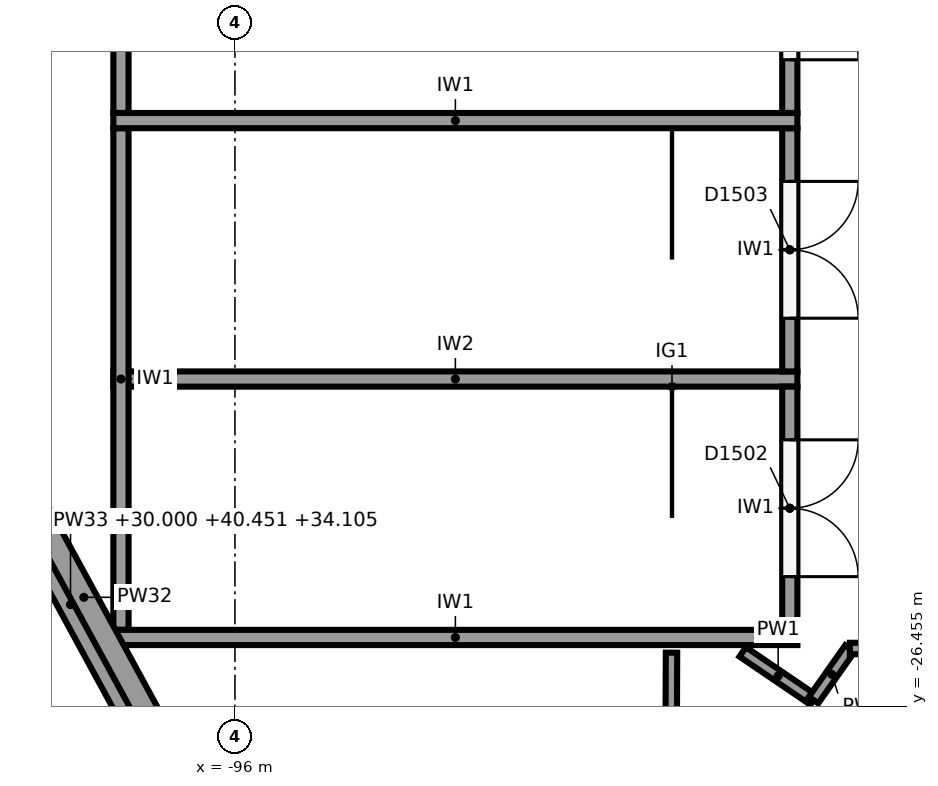
"""IFC4 building model, lengths in metres.
Left out: names, types, materials, properties, quantities, classifications, styles, units other than length and angle.
Written with IfcOpenShell. Run it as: python <this file> out.ifc"""

import sys

from ifc_helpers import new_model, si_unit, direction, frame, frame_2d, origin, place, context, subcontext, project, spatial, polyline, rectangle, outline, extrude, element, fill, save


model = new_model("IFC4")
c1 = context("Model", 3, precision=1e-05, world=origin(), true_north=direction((0.0, 1.0)))
c2 = subcontext(c1, "Body", "Model", "MODEL_VIEW")
j1 = project(units=[si_unit("LENGTHUNIT", "METRE"), si_unit("PLANEANGLEUNIT", "RADIAN")], contexts=[c1])
p1 = place(None, origin())
s1 = spatial("IfcSite", under=j1, at=p1, CompositionType="ELEMENT")
p2 = place(p1, origin())
s2 = spatial("IfcBuilding", under=s1, at=p2, CompositionType="ELEMENT")
p3 = place(p2, frame((0.0, 0.0, 24.0)))
s3 = spatial("IfcBuildingStorey", under=s2, at=p3, CompositionType="ELEMENT", Elevation=24.0)
p4 = place(p3, frame((-101.337, -18.215, 0.0), z_axis=(0.0, 0.0, 1.0), x_axis=(0.477865020076, 0.878433277255, 0.0)))
e1 = element("IfcWall", 1, at=p4, inside=s3, PredefinedType="SOLIDWALL", context=c2, shape_type="SweptSolid", body=[
    extrude(rectangle(XDim=7.28, YDim=0.32, at=frame_2d((3.64, 0.0))), origin(), (0.0, 0.0, 1.0), 6.0),
])
p5 = place(p4, frame((1.13, 0.0, 1.0)))
e2 = element("IfcOpeningElement", 2, at=p5, cuts=e1, PredefinedType="OPENING", context=c2, shape_type="SweptSolid", body=[
    extrude(rectangle(XDim=0.9, YDim=3.25, at=frame_2d((0.45, 1.625))), frame((0.0, 0.17, 0.0), z_axis=(0.0, -1.0, 0.0), x_axis=(1.0, 0.0, 0.0)), (0.0, 0.0, 1.0), 0.34),
])
p6 = place(p3, frame((-101.337, -18.215, 6.0), z_axis=(0.0, 0.0, 1.0), x_axis=(0.477865020076, 0.878433277255, 0.0)))
e3 = element("IfcWall", 3, at=p6, inside=s3, PredefinedType="SOLIDWALL", context=c2, shape_type="SweptSolid", body=[
    extrude(outline(polyline([(0.0, 0.0), (7.28, 0.0), (7.28, 6.972), (0.0, 10.451), (0.0, 0.0)])), frame((0.0, 0.16, 0.0), z_axis=(0.0, -1.0, 0.0), x_axis=(1.0, 0.0, 0.0)), (0.0, 0.0, 1.0), 0.32),
])
p7 = place(p6, frame((1.13, 0.0, 1.6)))
e4 = element("IfcOpeningElement", 4, at=p7, cuts=e3, PredefinedType="OPENING", context=c2, shape_type="SweptSolid", body=[
    extrude(rectangle(XDim=0.9, YDim=3.0, at=frame_2d((0.45, 1.5))), frame((0.0, 0.17, 0.0), z_axis=(0.0, -1.0, 0.0), x_axis=(1.0, 0.0, 0.0)), (0.0, 0.0, 1.0), 0.34),
])
p8 = place(p3, frame((-94.815, -30.855, 0.0), z_axis=(0.0, 0.0, 1.0), x_axis=(-0.477867771117, 0.878431780691, 0.0)))
e5 = element("IfcWall", 5, at=p8, inside=s3, PredefinedType="SOLIDWALL", context=c2, shape_type="SweptSolid", body=[
    extrude(rectangle(XDim=13.28, YDim=0.32, at=frame_2d((6.64, 0.0))), origin(), (0.0, 0.0, 1.0), 6.0),
])
p9 = place(p8, frame((0.75, 0.0, 1.0)))
e6 = element("IfcOpeningElement", 6, at=p9, cuts=e5, PredefinedType="OPENING", context=c2, shape_type="SweptSolid", body=[
    extrude(rectangle(XDim=0.9, YDim=3.25, at=frame_2d((0.45, 1.625))), frame((0.0, 0.17, 0.0), z_axis=(0.0, -1.0, 0.0), x_axis=(1.0, 0.0, 0.0)), (0.0, 0.0, 1.0), 0.34),
])
p10 = place(p8, frame((2.85, 0.0, 1.0)))
e7 = element("IfcOpeningElement", 7, at=p10, cuts=e5, PredefinedType="OPENING", context=c2, shape_type="SweptSolid", body=[
    extrude(rectangle(XDim=0.9, YDim=3.25, at=frame_2d((0.45, 1.625))), frame((0.0, 0.17, 0.0), z_axis=(0.0, -1.0, 0.0), x_axis=(1.0, 0.0, 0.0)), (0.0, 0.0, 1.0), 0.34),
])
p11 = place(p8, frame((11.25, 0.0, 1.0)))
e8 = element("IfcOpeningElement", 8, at=p11, cuts=e5, PredefinedType="OPENING", context=c2, shape_type="SweptSolid", body=[
    extrude(rectangle(XDim=0.9, YDim=3.25, at=frame_2d((0.45, 1.625))), frame((0.0, 0.17, 0.0), z_axis=(0.0, -1.0, 0.0), x_axis=(1.0, 0.0, 0.0)), (0.0, 0.0, 1.0), 0.34),
])
p12 = place(p3, frame((-94.991, -30.95, 6.0), z_axis=(0.0, 0.0, 1.0), x_axis=(-0.477867771117, 0.878431780691, 0.0)))
e9 = element("IfcWall", 9, at=p12, inside=s3, PredefinedType="SOLIDWALL", context=c2, shape_type="SweptSolid", body=[
    extrude(outline(polyline([(0.0, 0.0), (13.28, 0.0), (13.28, 10.451), (0.0, 4.105), (0.0, 0.0)])), frame((0.0, 0.16, 0.0), z_axis=(0.0, -1.0, 0.0), x_axis=(1.0, 0.0, 0.0)), (0.0, 0.0, 1.0), 0.32),
])
p13 = place(p12, frame((2.85, 0.0, 1.6)))
e10 = element("IfcOpeningElement", 10, at=p13, cuts=e9, PredefinedType="OPENING", context=c2, shape_type="SweptSolid", body=[
    extrude(rectangle(XDim=0.9, YDim=3.0, at=frame_2d((0.45, 1.5))), frame((0.0, 0.17, 0.0), z_axis=(0.0, -1.0, 0.0), x_axis=(1.0, 0.0, 0.0)), (0.0, 0.0, 1.0), 0.34),
])
p14 = place(p12, frame((11.25, 0.0, 1.6)))
e11 = element("IfcOpeningElement", 11, at=p14, cuts=e9, PredefinedType="OPENING", context=c2, shape_type="SweptSolid", body=[
    extrude(rectangle(XDim=0.9, YDim=3.0, at=frame_2d((0.45, 1.5))), frame((0.0, 0.17, 0.0), z_axis=(0.0, -1.0, 0.0), x_axis=(1.0, 0.0, 0.0)), (0.0, 0.0, 1.0), 0.34),
])
for number, where, z_axis, x_axis in (
    (12, (-97.6, -18.75, 0.0), (0.0, 0.0, 1.0), (1.0, 0.0, 0.0)),
    (13, (-97.6, -25.55, 0.0), (0.0, 0.0, 1.0), (1.0, 0.0, 0.0)),
):
    element("IfcWall", number, at=place(p3, frame(where, z_axis=z_axis, x_axis=x_axis)), inside=s3, PredefinedType="SHEAR", context=c2, shape_type="SweptSolid", body=[
        extrude(rectangle(XDim=9.0, YDim=0.2, at=frame_2d((4.5, 0.0))), origin(), (0.0, 0.0, 1.0), 5.75),
    ])
for number, where, z_axis, x_axis in (
    (14, (-97.5, -12.05, 0.0), (0.0, 0.0, 1.0), (0.0, -1.0, 0.0)),
    (15, (-97.5, -18.85, 0.0), (0.0, 0.0, 1.0), (0.0, -1.0, 0.0)),
):
    element("IfcWall", number, at=place(p3, frame(where, z_axis=z_axis, x_axis=x_axis)), inside=s3, PredefinedType="SHEAR", context=c2, shape_type="SweptSolid", body=[
        extrude(rectangle(XDim=6.6, YDim=0.2, at=frame_2d((3.3, 0.0))), origin(), (0.0, 0.0, 1.0), 5.75),
    ])
p15 = place(p3, frame((-97.6, -22.15, 0.0), z_axis=(0.0, 0.0, 1.0), x_axis=(1.0, 0.0, 0.0)))
e16 = element("IfcWall", 16, at=p15, inside=s3, PredefinedType="SHEAR", context=c2, shape_type="SweptSolid", body=[
    extrude(rectangle(XDim=9.0, YDim=0.2, at=frame_2d((4.5, 0.0))), origin(), (0.0, 0.0, 1.0), 5.75),
])
p16 = place(p3, frame((-88.7, -15.45, 0.0), z_axis=(0.0, 0.0, 1.0), x_axis=(0.0, -1.0, 0.0)))
e17 = element("IfcWall", 17, at=p16, inside=s3, PredefinedType="SHEAR", context=c2, shape_type="SweptSolid", body=[
    extrude(rectangle(XDim=3.2, YDim=0.2, at=frame_2d((1.6, 0.0))), origin(), (0.0, 0.0, 1.0), 5.75),
])
p17 = place(p16, frame((0.7, 0.0, 0.0)))
e18 = element("IfcOpeningElement", 18, at=p17, cuts=e17, PredefinedType="OPENING", context=c2, shape_type="SweptSolid", body=[
    extrude(rectangle(XDim=1.8, YDim=2.1, at=frame_2d((0.9, 1.05))), frame((0.0, 0.11, 0.0), z_axis=(0.0, -1.0, 0.0), x_axis=(1.0, 0.0, 0.0)), (0.0, 0.0, 1.0), 0.22),
])
p18 = place(p3, frame((-88.7, -18.85, 0.0), z_axis=(0.0, 0.0, 1.0), x_axis=(0.0, -1.0, 0.0)))
e19 = element("IfcWall", 19, at=p18, inside=s3, PredefinedType="SHEAR", context=c2, shape_type="SweptSolid", body=[
    extrude(rectangle(XDim=3.2, YDim=0.2, at=frame_2d((1.6, 0.0))), origin(), (0.0, 0.0, 1.0), 5.75),
])
p19 = place(p18, frame((0.7, 0.0, 0.0)))
e20 = element("IfcOpeningElement", 20, at=p19, cuts=e19, PredefinedType="OPENING", context=c2, shape_type="SweptSolid", body=[
    extrude(rectangle(XDim=1.8, YDim=2.1, at=frame_2d((0.9, 1.05))), frame((0.0, 0.11, 0.0), z_axis=(0.0, -1.0, 0.0), x_axis=(1.0, 0.0, 0.0)), (0.0, 0.0, 1.0), 0.22),
])
p20 = place(p3, frame((-88.7, -22.25, 0.0), z_axis=(0.0, 0.0, 1.0), x_axis=(0.0, -1.0, 0.0)))
e21 = element("IfcWall", 21, at=p20, inside=s3, PredefinedType="SHEAR", context=c2, shape_type="SweptSolid", body=[
    extrude(rectangle(XDim=3.2, YDim=0.2, at=frame_2d((1.6, 0.0))), origin(), (0.0, 0.0, 1.0), 5.75),
])
p21 = place(p20, frame((0.7, 0.0, 0.0)))
e22 = element("IfcOpeningElement", 22, at=p21, cuts=e21, PredefinedType="OPENING", context=c2, shape_type="SweptSolid", body=[
    extrude(rectangle(XDim=1.8, YDim=2.1, at=frame_2d((0.9, 1.05))), frame((0.0, 0.11, 0.0), z_axis=(0.0, -1.0, 0.0), x_axis=(1.0, 0.0, 0.0)), (0.0, 0.0, 1.0), 0.22),
])
p22 = place(p3, frame((-90.256, -25.75, 0.0), z_axis=(0.0, 0.0, 1.0), x_axis=(-0.004030747762, -0.999991876503, 0.0)))
e23 = element("IfcWall", 23, at=p22, inside=s3, PredefinedType="PARTITIONING", context=c2, shape_type="SweptSolid", body=[
    extrude(rectangle(XDim=4.664, YDim=0.15, at=frame_2d((2.332, 0.0))), origin(), (0.0, 0.0, 1.0), 5.4),
])
p23 = place(p22, frame((1.95, 0.0, 0.0)))
e24 = element("IfcOpeningElement", 24, at=p23, cuts=e23, PredefinedType="OPENING", context=c2, shape_type="SweptSolid", body=[
    extrude(rectangle(XDim=1.0, YDim=2.1, at=frame_2d((0.5, 1.05))), frame((0.0, 0.085, 0.0), z_axis=(0.0, -1.0, 0.0), x_axis=(1.0, 0.0, 0.0)), (0.0, 0.0, 1.0), 0.17),
])
p24 = place(p3, frame((-89.32, -25.74, 0.0), z_axis=(0.0, 0.0, 1.0), x_axis=(0.827055308354, -0.562120553728, 0.0)))
e25 = element("IfcWall", 25, at=p24, inside=s3, PredefinedType="PARTITIONING", context=c2, shape_type="SweptSolid", body=[
    extrude(rectangle(XDim=1.128, YDim=0.15, at=frame_2d((0.564, 0.0))), origin(), (0.0, 0.0, 1.0), 5.4),
])
p25 = place(p3, frame((-88.387, -26.374, 0.0), z_axis=(0.0, 0.0, 1.0), x_axis=(0.575376756214, 0.817888493872, 0.0)))
e26 = element("IfcWall", 26, at=p25, inside=s3, PredefinedType="PARTITIONING", context=c2, shape_type="SweptSolid", body=[
    extrude(rectangle(XDim=0.83, YDim=0.15, at=frame_2d((0.415, 0.0))), origin(), (0.0, 0.0, 1.0), 5.4),
])
p26 = place(p3, frame((-87.909, -25.695, 0.0), z_axis=(0.0, 0.0, 1.0), x_axis=(1.0, 0.0, 0.0)))
e27 = element("IfcWall", 27, at=p26, inside=s3, PredefinedType="PARTITIONING", context=c2, shape_type="SweptSolid", body=[
    extrude(rectangle(XDim=3.704, YDim=0.15, at=frame_2d((1.852, 0.0))), origin(), (0.0, 0.0, 1.0), 5.4),
])
p27 = place(p26, frame((0.65, 0.0, 0.0)))
e28 = element("IfcOpeningElement", 28, at=p27, cuts=e27, PredefinedType="OPENING", context=c2, shape_type="SweptSolid", body=[
    extrude(rectangle(XDim=1.8, YDim=2.1, at=frame_2d((0.9, 1.05))), frame((0.0, 0.085, 0.0), z_axis=(0.0, -1.0, 0.0), x_axis=(1.0, 0.0, 0.0)), (0.0, 0.0, 1.0), 0.17),
])
p28 = place(p17, origin())
e29 = element("IfcDoor", 29, at=p28, inside=s3, OperationType="DOUBLE_DOOR_SINGLE_SWING", PredefinedType="DOOR", context=c2, shape_type="SweptSolid", body=[
    extrude(rectangle(XDim=1.8, YDim=2.1, at=frame_2d((0.9, 1.05))), frame((0.0, 0.025, 0.0), z_axis=(0.0, -1.0, 0.0), x_axis=(1.0, 0.0, 0.0)), (0.0, 0.0, 1.0), 0.05),
])
fill(e18, e29)
p29 = place(p19, origin())
e30 = element("IfcDoor", 30, at=p29, inside=s3, OperationType="DOUBLE_DOOR_SINGLE_SWING", PredefinedType="DOOR", context=c2, shape_type="SweptSolid", body=[
    extrude(rectangle(XDim=1.8, YDim=2.1, at=frame_2d((0.9, 1.05))), frame((0.0, 0.025, 0.0), z_axis=(0.0, -1.0, 0.0), x_axis=(1.0, 0.0, 0.0)), (0.0, 0.0, 1.0), 0.05),
])
fill(e20, e30)
p30 = place(p21, origin())
e31 = element("IfcDoor", 31, at=p30, inside=s3, OperationType="DOUBLE_DOOR_SINGLE_SWING", PredefinedType="DOOR", context=c2, shape_type="SweptSolid", body=[
    extrude(rectangle(XDim=1.8, YDim=2.1, at=frame_2d((0.9, 1.05))), frame((0.0, 0.025, 0.0), z_axis=(0.0, -1.0, 0.0), x_axis=(1.0, 0.0, 0.0)), (0.0, 0.0, 1.0), 0.05),
])
fill(e22, e31)
save(model, sys.argv[1])
